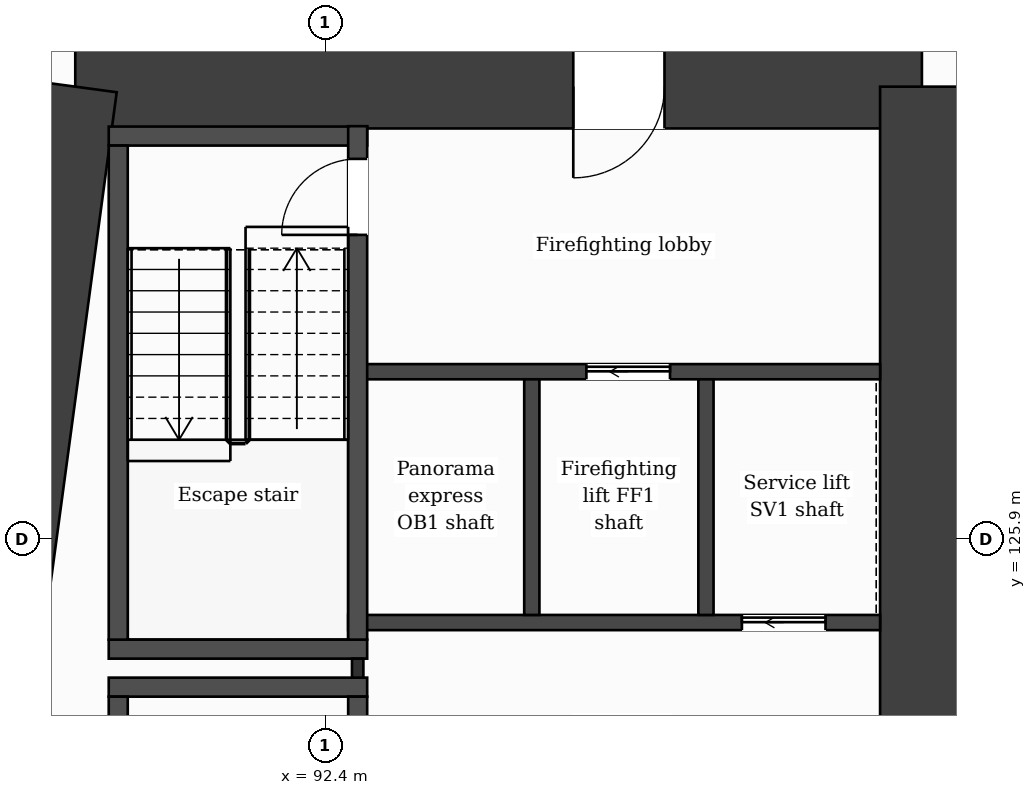
"""IFC4 building model, lengths in metres.
Left out: names, types, materials, properties, quantities, classifications, styles, units other than length and angle.
Written with IfcOpenShell. Run it as: python <this file> out.ifc"""

import sys

from ifc_helpers import new_model, si_unit, direction, frame, frame_2d, origin, place, context, subcontext, project, spatial, rectangle, extrude, element, fill, save


model = new_model("IFC4")
c1 = context("Model", 3, precision=1e-05, world=origin(), true_north=direction((0.0, 1.0)))
c2 = subcontext(c1, "Body", "Model", "MODEL_VIEW")
j1 = project(units=[si_unit("LENGTHUNIT", "METRE"), si_unit("PLANEANGLEUNIT", "RADIAN")], contexts=[c1])
p1 = place(None, origin())
s1 = spatial("IfcSite", under=j1, at=p1, CompositionType="ELEMENT")
p2 = place(p1, origin())
s2 = spatial("IfcBuilding", under=s1, at=p2, CompositionType="ELEMENT")
p3 = place(p2, frame((0.0, 0.0, 67.0)))
s3 = spatial("IfcBuildingStorey", under=s2, at=p3, CompositionType="ELEMENT", Elevation=67.0)
p4 = place(p3, frame((89.112, 131.85, 0.0), z_axis=(0.0, 0.0, 1.0), x_axis=(1.0, 0.0, 0.0)))
e1 = element("IfcWall", 1, at=p4, inside=s3, PredefinedType="SHEAR", context=c2, shape_type="SweptSolid", body=[
    extrude(rectangle(XDim=11.138, YDim=1.1, at=frame_2d((5.569, 0.0))), origin(), (0.0, 0.0, 1.0), 3.5),
])
p5 = place(p4, frame((6.552, 0.0, 0.0)))
e2 = element("IfcOpeningElement", 2, at=p5, cuts=e1, PredefinedType="OPENING", context=c2, shape_type="SweptSolid", body=[
    extrude(rectangle(XDim=1.2, YDim=2.1, at=frame_2d((0.6, 1.05))), frame((0.0, 0.56, 0.0), z_axis=(0.0, -1.0, 0.0), x_axis=(1.0, 0.0, 0.0)), (0.0, 0.0, 1.0), 1.12),
])
p6 = place(p3, frame((100.25, 131.85, 0.0), z_axis=(0.0, 0.0, 1.0), x_axis=(0.0, -1.0, 0.0)))
e3 = element("IfcWall", 3, at=p6, inside=s3, PredefinedType="SHEAR", context=c2, shape_type="SweptSolid", body=[
    extrude(rectangle(XDim=20.9, YDim=1.1, at=frame_2d((10.45, 0.0))), origin(), (0.0, 0.0, 1.0), 3.5),
])
p7 = place(p3, frame((86.298, 110.95, 0.0), z_axis=(0.0, 0.0, 1.0), x_axis=(0.133400422634, 0.99106222168, 0.0)))
e4 = element("IfcWall", 4, at=p7, inside=s3, PredefinedType="SHEAR", context=c2, shape_type="SweptSolid", body=[
    extrude(rectangle(XDim=21.089, YDim=1.1, at=frame_2d((10.544, 0.0))), origin(), (0.0, 0.0, 1.0), 3.5),
])
for number, where, z_axis, x_axis in (
    (5, (89.552, 123.95, 0.0), (0.0, 0.0, 1.0), (1.0, 0.0, 0.0)),
    (6, (89.552, 124.45, 0.0), (0.0, 0.0, 1.0), (1.0, 0.0, 0.0)),
):
    element("IfcWall", number, at=place(p3, frame(where, z_axis=z_axis, x_axis=x_axis)), inside=s3, PredefinedType="PARTITIONING", context=c2, shape_type="SweptSolid", body=[
        extrude(rectangle(XDim=3.4, YDim=0.25, at=frame_2d((1.7, 0.0))), origin(), (0.0, 0.0, 1.0), 3.18),
    ])
p8 = place(p3, frame((92.702, 124.8, 0.0), z_axis=(0.0, 0.0, 1.0), x_axis=(1.0, 0.0, 0.0)))
e7 = element("IfcWall", 7, at=p8, inside=s3, PredefinedType="PARTITIONING", context=c2, shape_type="SweptSolid", body=[
    extrude(rectangle(XDim=6.998, YDim=0.2, at=frame_2d((3.499, 0.0))), origin(), (0.0, 0.0, 1.0), 3.18),
])
p9 = place(p8, frame((5.18, 0.0, 0.0)))
e8 = element("IfcOpeningElement", 8, at=p9, cuts=e7, PredefinedType="OPENING", context=c2, shape_type="SweptSolid", body=[
    extrude(rectangle(XDim=1.1, YDim=2.1, at=frame_2d((0.55, 1.05))), frame((0.0, 0.11, 0.0), z_axis=(0.0, -1.0, 0.0), x_axis=(1.0, 0.0, 0.0)), (0.0, 0.0, 1.0), 0.22),
])
p10 = place(p3, frame((92.827, 128.1, 0.0), z_axis=(0.0, 0.0, 1.0), x_axis=(1.0, 0.0, 0.0)))
e9 = element("IfcWall", 9, at=p10, inside=s3, PredefinedType="PARTITIONING", context=c2, shape_type="SweptSolid", body=[
    extrude(rectangle(XDim=6.873, YDim=0.2, at=frame_2d((3.437, 0.0))), origin(), (0.0, 0.0, 1.0), 3.18),
])
p11 = place(p10, frame((3.009, 0.0, 0.0)))
e10 = element("IfcOpeningElement", 10, at=p11, cuts=e9, PredefinedType="OPENING", context=c2, shape_type="SweptSolid", body=[
    extrude(rectangle(XDim=1.1, YDim=2.1, at=frame_2d((0.55, 1.05))), frame((0.0, 0.11, 0.0), z_axis=(0.0, -1.0, 0.0), x_axis=(1.0, 0.0, 0.0)), (0.0, 0.0, 1.0), 0.22),
])
p12 = place(p3, frame((89.552, 131.2, 0.0), z_axis=(0.0, 0.0, 1.0), x_axis=(1.0, 0.0, 0.0)))
e11 = element("IfcWall", 11, at=p12, inside=s3, PredefinedType="PARTITIONING", context=c2, shape_type="SweptSolid", body=[
    extrude(rectangle(XDim=3.4, YDim=0.25, at=frame_2d((1.7, 0.0))), origin(), (0.0, 0.0, 1.0), 3.18),
])
p13 = place(p3, frame((89.677, 117.07, 0.0), z_axis=(0.0, 0.0, 1.0), x_axis=(0.0, 1.0, 0.0)))
e12 = element("IfcWall", 12, at=p13, inside=s3, PredefinedType="PARTITIONING", context=c2, shape_type="SweptSolid", body=[
    extrude(rectangle(XDim=6.755, YDim=0.25, at=frame_2d((3.377, 0.0))), origin(), (0.0, 0.0, 1.0), 3.18),
])
p14 = place(p3, frame((89.677, 124.575, 0.0), z_axis=(0.0, 0.0, 1.0), x_axis=(0.0, 1.0, 0.0)))
e13 = element("IfcWall", 13, at=p14, inside=s3, PredefinedType="PARTITIONING", context=c2, shape_type="SweptSolid", body=[
    extrude(rectangle(XDim=6.5, YDim=0.25, at=frame_2d((3.25, 0.0))), origin(), (0.0, 0.0, 1.0), 3.18),
])
p15 = place(p3, frame((92.827, 124.075, 0.0), z_axis=(0.0, 0.0, 1.0), x_axis=(0.0, 1.0, 0.0)))
e14 = element("IfcWall", 14, at=p15, inside=s3, PredefinedType="PARTITIONING", context=c2, shape_type="SweptSolid", body=[
    extrude(rectangle(XDim=0.25, YDim=0.15, at=frame_2d((0.125, 0.0))), origin(), (0.0, 0.0, 1.0), 3.18),
])
p16 = place(p3, frame((92.827, 117.07, 0.0), z_axis=(0.0, 0.0, 1.0), x_axis=(0.0, 1.0, 0.0)))
e15 = element("IfcWall", 15, at=p16, inside=s3, PredefinedType="PARTITIONING", context=c2, shape_type="SweptSolid", body=[
    extrude(rectangle(XDim=6.755, YDim=0.25, at=frame_2d((3.377, 0.0))), origin(), (0.0, 0.0, 1.0), 3.18),
])
p17 = place(p16, frame((5.455, 0.0, 0.0)))
e16 = element("IfcOpeningElement", 16, at=p17, cuts=e15, PredefinedType="OPENING", context=c2, shape_type="SweptSolid", body=[
    extrude(rectangle(XDim=0.95, YDim=2.1, at=frame_2d((0.475, 1.05))), frame((0.0, 0.135, 0.0), z_axis=(0.0, -1.0, 0.0), x_axis=(1.0, 0.0, 0.0)), (0.0, 0.0, 1.0), 0.27),
])
p18 = place(p3, frame((92.827, 124.575, 0.0), z_axis=(0.0, 0.0, 1.0), x_axis=(0.0, 1.0, 0.0)))
e17 = element("IfcWall", 17, at=p18, inside=s3, PredefinedType="PARTITIONING", context=c2, shape_type="SweptSolid", body=[
    extrude(rectangle(XDim=6.755, YDim=0.25, at=frame_2d((3.377, 0.0))), origin(), (0.0, 0.0, 1.0), 3.18),
])
p19 = place(p18, frame((5.325, 0.0, 0.0)))
e18 = element("IfcOpeningElement", 18, at=p19, cuts=e17, PredefinedType="OPENING", context=c2, shape_type="SweptSolid", body=[
    extrude(rectangle(XDim=1.0, YDim=2.1, at=frame_2d((0.5, 1.05))), frame((0.0, 0.135, 0.0), z_axis=(0.0, -1.0, 0.0), x_axis=(1.0, 0.0, 0.0)), (0.0, 0.0, 1.0), 0.27),
])
for number, where, z_axis, x_axis in (
    (19, (95.118, 124.9, 0.0), (0.0, 0.0, 1.0), (0.0, 1.0, 0.0)),
    (20, (97.409, 124.9, 0.0), (0.0, 0.0, 1.0), (0.0, 1.0, 0.0)),
):
    element("IfcWall", number, at=place(p3, frame(where, z_axis=z_axis, x_axis=x_axis)), inside=s3, PredefinedType="PARTITIONING", context=c2, shape_type="SweptSolid", body=[
        extrude(rectangle(XDim=3.1, YDim=0.2, at=frame_2d((1.55, 0.0))), origin(), (0.0, 0.0, 1.0), 3.18),
    ])
p20 = place(p11, origin())
e21 = element("IfcDoor", 21, at=p20, inside=s3, OperationType="SLIDING_TO_LEFT", PredefinedType="DOOR", context=c2, shape_type="SweptSolid", body=[
    extrude(rectangle(XDim=1.1, YDim=2.1, at=frame_2d((0.55, 1.05))), frame((0.0, 0.025, 0.0), z_axis=(0.0, -1.0, 0.0), x_axis=(1.0, 0.0, 0.0)), (0.0, 0.0, 1.0), 0.05),
])
fill(e10, e21)
p21 = place(p9, origin())
e22 = element("IfcDoor", 22, at=p21, inside=s3, OperationType="SLIDING_TO_LEFT", PredefinedType="DOOR", context=c2, shape_type="SweptSolid", body=[
    extrude(rectangle(XDim=1.1, YDim=2.1, at=frame_2d((0.55, 1.05))), frame((0.0, 0.025, 0.0), z_axis=(0.0, -1.0, 0.0), x_axis=(1.0, 0.0, 0.0)), (0.0, 0.0, 1.0), 0.05),
])
fill(e8, e22)
p22 = place(p19, origin())
e23 = element("IfcDoor", 23, at=p22, inside=s3, OperationType="SINGLE_SWING_LEFT", PredefinedType="DOOR", context=c2, shape_type="SweptSolid", body=[
    extrude(rectangle(XDim=1.0, YDim=2.1, at=frame_2d((0.5, 1.05))), frame((0.0, 0.025, 0.0), z_axis=(0.0, -1.0, 0.0), x_axis=(1.0, 0.0, 0.0)), (0.0, 0.0, 1.0), 0.05),
])
fill(e18, e23)
p23 = place(p5, origin())
e24 = element("IfcDoor", 24, at=p23, inside=s3, OperationType="SINGLE_SWING_LEFT", PredefinedType="DOOR", context=c2, shape_type="SweptSolid", body=[
    extrude(rectangle(XDim=1.2, YDim=2.1, at=frame_2d((0.6, 1.05))), frame((0.0, 0.025, 0.0), z_axis=(0.0, -1.0, 0.0), x_axis=(1.0, 0.0, 0.0)), (0.0, 0.0, 1.0), 0.05),
])
fill(e2, e24)
save(model, sys.argv[1])
